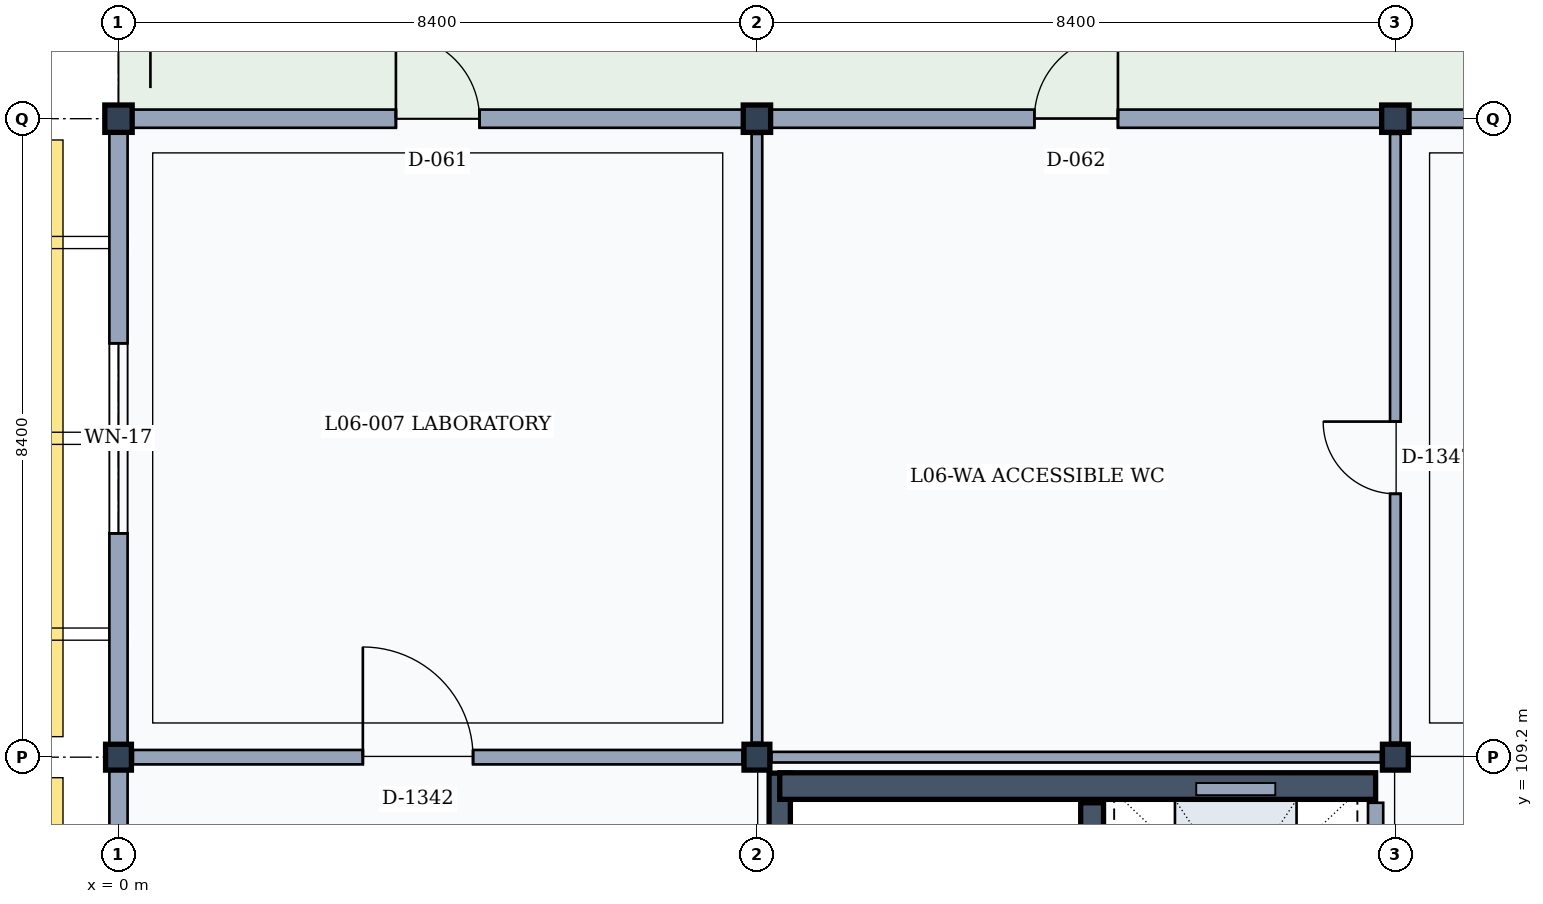
"""IFC4 building model, lengths in metres.
Left out: names, types, materials, properties, quantities, classifications, styles, units other than length and angle.
Written with IfcOpenShell. Run it as: python <this file> out.ifc"""

import sys

from ifc_helpers import new_model, si_unit, direction, frame, frame_2d, origin, origin_2d, place, context, subcontext, project, spatial, rectangle, extrude, element, fill, save


model = new_model("IFC4")
c1 = context("Model", 3, precision=1e-05, world=origin(), true_north=direction((0.0, 1.0)))
c2 = subcontext(c1, "Body", "Model", "MODEL_VIEW")
j1 = project(units=[si_unit("LENGTHUNIT", "METRE"), si_unit("PLANEANGLEUNIT", "RADIAN")], contexts=[c1])
p1 = place(None, origin())
s1 = spatial("IfcSite", under=j1, at=p1, CompositionType="ELEMENT")
p2 = place(p1, origin())
s2 = spatial("IfcBuilding", under=s1, at=p2, CompositionType="ELEMENT")
p3 = place(p2, frame((0.0, 0.0, 26.4)))
s3 = spatial("IfcBuildingStorey", under=s2, at=p3, CompositionType="ELEMENT", Elevation=26.4)
p4 = place(p3, frame((0.0, 109.2, 0.0), z_axis=(0.0, 0.0, 1.0), x_axis=(1.0, 0.0, 0.0)))
e1 = element("IfcColumn", 1, at=p4, inside=s3, PredefinedType="COLUMN", context=c2, shape_type="SweptSolid", body=[
    extrude(rectangle(XDim=0.34, YDim=0.34, at=origin_2d()), origin(), (0.0, 0.0, 1.0), 4.2),
])
p5 = place(p3, frame((0.0, 117.6, 0.0), z_axis=(0.0, 0.0, 1.0), x_axis=(1.0, 0.0, 0.0)))
e2 = element("IfcColumn", 2, at=p5, inside=s3, PredefinedType="COLUMN", context=c2, shape_type="SweptSolid", body=[
    extrude(rectangle(XDim=0.36, YDim=0.36, at=origin_2d()), origin(), (0.0, 0.0, 1.0), 4.2),
])
p6 = place(p3, frame((8.4, 109.2, 0.0), z_axis=(0.0, 0.0, 1.0), x_axis=(1.0, 0.0, 0.0)))
e3 = element("IfcColumn", 3, at=p6, inside=s3, PredefinedType="COLUMN", context=c2, shape_type="SweptSolid", body=[
    extrude(rectangle(XDim=0.34, YDim=0.34, at=origin_2d()), origin(), (0.0, 0.0, 1.0), 4.2),
])
p7 = place(p3, frame((8.4, 117.6, 0.0), z_axis=(0.0, 0.0, 1.0), x_axis=(1.0, 0.0, 0.0)))
e4 = element("IfcColumn", 4, at=p7, inside=s3, PredefinedType="COLUMN", context=c2, shape_type="SweptSolid", body=[
    extrude(rectangle(XDim=0.36, YDim=0.36, at=origin_2d()), origin(), (0.0, 0.0, 1.0), 4.2),
])
p8 = place(p3, frame((16.8, 109.2, 0.0), z_axis=(0.0, 0.0, 1.0), x_axis=(1.0, 0.0, 0.0)))
e5 = element("IfcColumn", 5, at=p8, inside=s3, PredefinedType="COLUMN", context=c2, shape_type="SweptSolid", body=[
    extrude(rectangle(XDim=0.34, YDim=0.34, at=origin_2d()), origin(), (0.0, 0.0, 1.0), 4.2),
])
p9 = place(p3, frame((16.8, 117.6, 0.0), z_axis=(0.0, 0.0, 1.0), x_axis=(1.0, 0.0, 0.0)))
e6 = element("IfcColumn", 6, at=p9, inside=s3, PredefinedType="COLUMN", context=c2, shape_type="SweptSolid", body=[
    extrude(rectangle(XDim=0.36, YDim=0.36, at=origin_2d()), origin(), (0.0, 0.0, 1.0), 4.2),
])
p10 = place(p3, frame((0.0, 100.98, 0.0), z_axis=(0.0, 0.0, 1.0), x_axis=(0.0, 1.0, 0.0)))
e7 = element("IfcWall", 7, at=p10, inside=s3, PredefinedType="SOLIDWALL", context=c2, shape_type="SweptSolid", body=[
    extrude(rectangle(XDim=8.05, YDim=0.24, at=frame_2d((4.025, 0.0))), origin(), (0.0, 0.0, 1.0), 3.36),
])
p11 = place(p10, frame((2.525, 0.0, 0.9)))
e8 = element("IfcOpeningElement", 8, at=p11, cuts=e7, PredefinedType="OPENING", context=c2, shape_type="SweptSolid", body=[
    extrude(rectangle(XDim=3.0, YDim=1.8, at=frame_2d((1.5, 0.9))), frame((0.0, 0.13, 0.0), z_axis=(0.0, -1.0, 0.0), x_axis=(1.0, 0.0, 0.0)), (0.0, 0.0, 1.0), 0.26),
])
p12 = place(p3, frame((0.18, 117.6, 0.0), z_axis=(0.0, 0.0, 1.0), x_axis=(1.0, 0.0, 0.0)))
e9 = element("IfcWall", 9, at=p12, inside=s3, PredefinedType="SOLIDWALL", context=c2, shape_type="SweptSolid", body=[
    extrude(rectangle(XDim=8.04, YDim=0.24, at=frame_2d((4.02, 0.0))), origin(), (0.0, 0.0, 1.0), 3.36),
])
p13 = place(p12, frame((3.47, 0.0, 0.0)))
e10 = element("IfcOpeningElement", 10, at=p13, cuts=e9, PredefinedType="OPENING", context=c2, shape_type="SweptSolid", body=[
    extrude(rectangle(XDim=1.1, YDim=2.2, at=frame_2d((0.55, 1.1))), frame((0.0, 0.13, 0.0), z_axis=(0.0, -1.0, 0.0), x_axis=(1.0, 0.0, 0.0)), (0.0, 0.0, 1.0), 0.26),
])
p14 = place(p3, frame((0.0, 109.37, 0.0), z_axis=(0.0, 0.0, 1.0), x_axis=(0.0, 1.0, 0.0)))
e11 = element("IfcWall", 11, at=p14, inside=s3, PredefinedType="SOLIDWALL", context=c2, shape_type="SweptSolid", body=[
    extrude(rectangle(XDim=8.05, YDim=0.24, at=frame_2d((4.025, 0.0))), origin(), (0.0, 0.0, 1.0), 3.36),
])
p15 = place(p14, frame((2.775, 0.0, 0.9)))
e12 = element("IfcOpeningElement", 12, at=p15, cuts=e11, PredefinedType="OPENING", context=c2, shape_type="SweptSolid", body=[
    extrude(rectangle(XDim=2.5, YDim=2.0, at=frame_2d((1.25, 1.0))), frame((0.0, 0.13, 0.0), z_axis=(0.0, -1.0, 0.0), x_axis=(1.0, 0.0, 0.0)), (0.0, 0.0, 1.0), 0.26),
])
p16 = place(p3, frame((8.58, 117.6, 0.0), z_axis=(0.0, 0.0, 1.0), x_axis=(1.0, 0.0, 0.0)))
e13 = element("IfcWall", 13, at=p16, inside=s3, PredefinedType="SOLIDWALL", context=c2, shape_type="SweptSolid", body=[
    extrude(rectangle(XDim=8.04, YDim=0.24, at=frame_2d((4.02, 0.0))), origin(), (0.0, 0.0, 1.0), 3.36),
])
p17 = place(p16, frame((3.47, 0.0, 0.0)))
e14 = element("IfcOpeningElement", 14, at=p17, cuts=e13, PredefinedType="OPENING", context=c2, shape_type="SweptSolid", body=[
    extrude(rectangle(XDim=1.1, YDim=2.2, at=frame_2d((0.55, 1.1))), frame((0.0, 0.13, 0.0), z_axis=(0.0, -1.0, 0.0), x_axis=(1.0, 0.0, 0.0)), (0.0, 0.0, 1.0), 0.26),
])
p18 = place(p3, frame((16.98, 117.6, 0.0), z_axis=(0.0, 0.0, 1.0), x_axis=(1.0, 0.0, 0.0)))
e15 = element("IfcWall", 15, at=p18, inside=s3, PredefinedType="SOLIDWALL", context=c2, shape_type="SweptSolid", body=[
    extrude(rectangle(XDim=8.04, YDim=0.24, at=frame_2d((4.02, 0.0))), origin(), (0.0, 0.0, 1.0), 3.36),
])
p19 = place(p18, frame((3.47, 0.0, 0.0)))
e16 = element("IfcOpeningElement", 16, at=p19, cuts=e15, PredefinedType="OPENING", context=c2, shape_type="SweptSolid", body=[
    extrude(rectangle(XDim=1.1, YDim=2.2, at=frame_2d((0.55, 1.1))), frame((0.0, 0.13, 0.0), z_axis=(0.0, -1.0, 0.0), x_axis=(1.0, 0.0, 0.0)), (0.0, 0.0, 1.0), 0.26),
])
p20 = place(p3, frame((8.7, 101.05, 0.0), z_axis=(0.0, 0.0, 1.0), x_axis=(0.0, 1.0, 0.0)))
e17 = element("IfcWall", 17, at=p20, inside=s3, PredefinedType="SHEAR", context=c2, shape_type="SweptSolid", body=[
    extrude(rectangle(XDim=7.94, YDim=0.28, at=frame_2d((3.97, 0.0))), origin(), (0.0, 0.0, 1.0), 3.99),
])
p21 = place(p3, frame((8.7, 108.82, 0.0), z_axis=(0.0, 0.0, 1.0), x_axis=(1.0, 0.0, 0.0)))
e18 = element("IfcWall", 18, at=p21, inside=s3, PredefinedType="SHEAR", context=c2, shape_type="SweptSolid", body=[
    extrude(rectangle(XDim=7.84, YDim=0.35, at=frame_2d((3.92, 0.0))), origin(), (0.0, 0.0, 1.0), 3.99),
])
p22 = place(p3, frame((16.54, 108.6, 0.0), z_axis=(0.0, 0.0, 1.0), x_axis=(0.0, -1.0, 0.0)))
e19 = element("IfcWall", 19, at=p22, inside=s3, PredefinedType="PARTITIONING", context=c2, shape_type="SweptSolid", body=[
    extrude(rectangle(XDim=7.2, YDim=0.2, at=frame_2d((3.6, 0.0))), origin(), (0.0, 0.0, 1.0), 3.32),
])
p23 = place(p22, frame((3.55, 0.0, 0.0)))
e20 = element("IfcOpeningElement", 20, at=p23, cuts=e19, PredefinedType="OPENING", context=c2, shape_type="SweptSolid", body=[
    extrude(rectangle(XDim=1.1, YDim=2.15, at=frame_2d((0.55, 1.075))), frame((0.0, 0.11, 0.0), z_axis=(0.0, -1.0, 0.0), x_axis=(1.0, 0.0, 0.0)), (0.0, 0.0, 1.0), 0.22),
])
p24 = place(p3, frame((12.81, 101.22, 0.0), z_axis=(0.0, 0.0, 1.0), x_axis=(0.0, 1.0, 0.0)))
e21 = element("IfcWall", 21, at=p24, inside=s3, PredefinedType="SHEAR", context=c2, shape_type="SweptSolid", body=[
    extrude(rectangle(XDim=7.38, YDim=0.3, at=frame_2d((3.69, 0.0))), origin(), (0.0, 0.0, 1.0), 3.99),
])
p25 = place(p24, frame((0.28, 0.0, 0.0)))
e22 = element("IfcOpeningElement", 22, at=p25, cuts=e21, PredefinedType="OPENING", context=c2, shape_type="SweptSolid", body=[
    extrude(rectangle(XDim=1.1, YDim=2.15, at=frame_2d((0.55, 1.075))), frame((0.0, 0.16, 0.0), z_axis=(0.0, -1.0, 0.0), x_axis=(1.0, 0.0, 0.0)), (0.0, 0.0, 1.0), 0.32),
])
p26 = place(p3, frame((0.19, 109.2, 0.0), z_axis=(0.0, 0.0, 1.0), x_axis=(1.0, 0.0, 0.0)))
e23 = element("IfcWall", 23, at=p26, inside=s3, PredefinedType="PARTITIONING", context=c2, shape_type="SweptSolid", body=[
    extrude(rectangle(XDim=8.02, YDim=0.19, at=frame_2d((4.01, 0.0))), origin(), (0.0, 0.0, 1.0), 3.32),
])
p27 = place(p26, frame((3.025, 0.0, 0.0)))
e24 = element("IfcOpeningElement", 24, at=p27, cuts=e23, PredefinedType="OPENING", context=c2, shape_type="SweptSolid", body=[
    extrude(rectangle(XDim=1.45, YDim=2.35, at=frame_2d((0.725, 1.175))), frame((0.0, 0.105, 0.0), z_axis=(0.0, -1.0, 0.0), x_axis=(1.0, 0.0, 0.0)), (0.0, 0.0, 1.0), 0.21),
])
p28 = place(p3, frame((8.4, 109.39, 0.0), z_axis=(0.0, 0.0, 1.0), x_axis=(0.0, 1.0, 0.0)))
e25 = element("IfcWall", 25, at=p28, inside=s3, PredefinedType="PARTITIONING", context=c2, shape_type="SweptSolid", body=[
    extrude(rectangle(XDim=8.01, YDim=0.14, at=frame_2d((4.005, 0.0))), origin(), (0.0, 0.0, 1.0), 3.32),
])
p29 = place(p3, frame((8.59, 109.2, 0.0), z_axis=(0.0, 0.0, 1.0), x_axis=(1.0, 0.0, 0.0)))
e26 = element("IfcWall", 26, at=p29, inside=s3, PredefinedType="PARTITIONING", context=c2, shape_type="SweptSolid", body=[
    extrude(rectangle(XDim=8.02, YDim=0.14, at=frame_2d((4.01, 0.0))), origin(), (0.0, 0.0, 1.0), 3.32),
])
p30 = place(p3, frame((16.8, 109.39, 0.0), z_axis=(0.0, 0.0, 1.0), x_axis=(0.0, 1.0, 0.0)))
e27 = element("IfcWall", 27, at=p30, inside=s3, PredefinedType="PARTITIONING", context=c2, shape_type="SweptSolid", body=[
    extrude(rectangle(XDim=8.01, YDim=0.14, at=frame_2d((4.005, 0.0))), origin(), (0.0, 0.0, 1.0), 3.32),
])
p31 = place(p30, frame((3.275, 0.0, 0.0)))
e28 = element("IfcOpeningElement", 28, at=p31, cuts=e27, PredefinedType="OPENING", context=c2, shape_type="SweptSolid", body=[
    extrude(rectangle(XDim=0.95, YDim=2.15, at=frame_2d((0.475, 1.075))), frame((0.0, 0.08, 0.0), z_axis=(0.0, -1.0, 0.0), x_axis=(1.0, 0.0, 0.0)), (0.0, 0.0, 1.0), 0.16),
])
p32 = place(p13, origin())
e29 = element("IfcDoor", 29, at=p32, inside=s3, OperationType="SINGLE_SWING_LEFT", PredefinedType="DOOR", context=c2, shape_type="SweptSolid", body=[
    extrude(rectangle(XDim=1.1, YDim=2.2, at=frame_2d((0.55, 1.1))), frame((0.0, 0.025, 0.0), z_axis=(0.0, -1.0, 0.0), x_axis=(1.0, 0.0, 0.0)), (0.0, 0.0, 1.0), 0.05),
])
fill(e10, e29)
p33 = place(p15, origin())
e30 = element("IfcWindow", 30, at=p33, inside=s3, PartitioningType="SINGLE_PANEL", PredefinedType="WINDOW", context=c2, shape_type="SweptSolid", body=[
    extrude(rectangle(XDim=2.5, YDim=2.0, at=frame_2d((1.25, 1.0))), frame((0.0, 0.03, 0.0), z_axis=(0.0, -1.0, 0.0), x_axis=(1.0, 0.0, 0.0)), (0.0, 0.0, 1.0), 0.06),
])
fill(e12, e30)
p34 = place(p17, origin())
e31 = element("IfcDoor", 31, at=p34, inside=s3, OperationType="SINGLE_SWING_RIGHT", PredefinedType="DOOR", context=c2, shape_type="SweptSolid", body=[
    extrude(rectangle(XDim=1.1, YDim=2.2, at=frame_2d((0.55, 1.1))), frame((0.0, 0.025, 0.0), z_axis=(0.0, -1.0, 0.0), x_axis=(1.0, 0.0, 0.0)), (0.0, 0.0, 1.0), 0.05),
])
fill(e14, e31)
p35 = place(p27, origin())
e32 = element("IfcDoor", 32, at=p35, inside=s3, OperationType="SINGLE_SWING_LEFT", PredefinedType="DOOR", context=c2, shape_type="SweptSolid", body=[
    extrude(rectangle(XDim=1.45, YDim=2.35, at=frame_2d((0.725, 1.175))), frame((0.0, 0.025, 0.0), z_axis=(0.0, -1.0, 0.0), x_axis=(1.0, 0.0, 0.0)), (0.0, 0.0, 1.0), 0.05),
])
fill(e24, e32)
p36 = place(p31, origin())
e33 = element("IfcDoor", 33, at=p36, inside=s3, OperationType="SINGLE_SWING_RIGHT", PredefinedType="DOOR", context=c2, shape_type="SweptSolid", body=[
    extrude(rectangle(XDim=0.95, YDim=2.15, at=frame_2d((0.475, 1.075))), frame((0.0, 0.025, 0.0), z_axis=(0.0, -1.0, 0.0), x_axis=(1.0, 0.0, 0.0)), (0.0, 0.0, 1.0), 0.05),
])
fill(e28, e33)
save(model, sys.argv[1])
